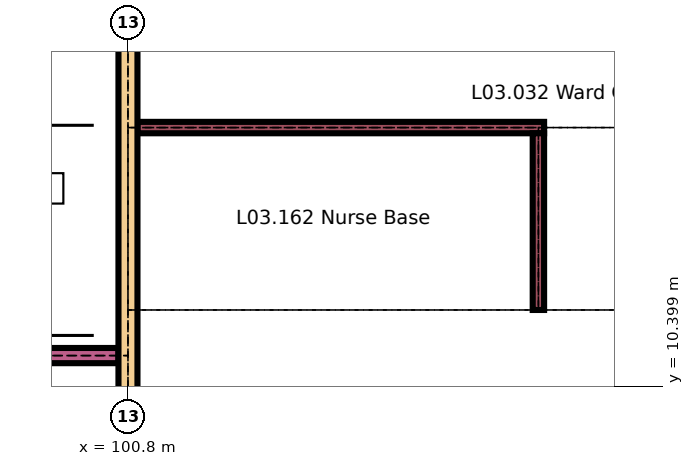
"""IFC4 building model, lengths in metres.
Left out: names, types, materials, properties, quantities, classifications, styles, units other than length and angle.
Written with IfcOpenShell. Run it as: python <this file> out.ifc"""

import sys

from ifc_helpers import new_model, si_unit, direction, frame, frame_2d, origin, place, context, subcontext, project, spatial, rectangle, extrude, element, fill, save


model = new_model("IFC4")
c1 = context("Model", 3, precision=1e-05, world=origin(), true_north=direction((0.0, 1.0)))
c2 = subcontext(c1, "Body", "Model", "MODEL_VIEW")
j1 = project(units=[si_unit("LENGTHUNIT", "METRE"), si_unit("PLANEANGLEUNIT", "RADIAN")], contexts=[c1])
p1 = place(None, origin())
s1 = spatial("IfcSite", under=j1, at=p1, CompositionType="ELEMENT")
p2 = place(p1, origin())
s2 = spatial("IfcBuilding", under=s1, at=p2, CompositionType="ELEMENT")
p3 = place(p2, frame((0.0, 0.0, 15.3)))
s3 = spatial("IfcBuildingStorey", under=s2, at=p3, CompositionType="ELEMENT", Elevation=15.3)
p4 = place(p3, frame((42.21, 12.6, 4.904), z_axis=(0.0, 0.0, 1.0), x_axis=(1.0, 0.0, 0.0)))
e1 = element("IfcWall", 1, at=p4, inside=s3, PredefinedType="SOLIDWALL", context=c2, shape_type="SweptSolid", body=[
    extrude(rectangle(XDim=58.38, YDim=0.2, at=frame_2d((29.19, 0.0))), origin(), (0.0, 0.0, 1.0), 2.539),
])
p5 = place(p4, frame((1.05, 0.0, 0.3)))
e2 = element("IfcOpeningElement", 2, at=p5, cuts=e1, PredefinedType="OPENING", context=c2, shape_type="SweptSolid", body=[
    extrude(rectangle(XDim=2.1, YDim=1.8, at=frame_2d((1.05, 0.9))), frame((0.0, 0.11, 0.0), z_axis=(0.0, -1.0, 0.0), x_axis=(1.0, 0.0, 0.0)), (0.0, 0.0, 1.0), 0.22),
])
p6 = place(p4, frame((5.25, 0.0, 0.3)))
e3 = element("IfcOpeningElement", 3, at=p6, cuts=e1, PredefinedType="OPENING", context=c2, shape_type="SweptSolid", body=[
    extrude(rectangle(XDim=2.1, YDim=1.8, at=frame_2d((1.05, 0.9))), frame((0.0, 0.11, 0.0), z_axis=(0.0, -1.0, 0.0), x_axis=(1.0, 0.0, 0.0)), (0.0, 0.0, 1.0), 0.22),
])
p7 = place(p4, frame((9.45, 0.0, 0.3)))
e4 = element("IfcOpeningElement", 4, at=p7, cuts=e1, PredefinedType="OPENING", context=c2, shape_type="SweptSolid", body=[
    extrude(rectangle(XDim=2.1, YDim=1.8, at=frame_2d((1.05, 0.9))), frame((0.0, 0.11, 0.0), z_axis=(0.0, -1.0, 0.0), x_axis=(1.0, 0.0, 0.0)), (0.0, 0.0, 1.0), 0.22),
])
p8 = place(p4, frame((13.65, 0.0, 0.3)))
e5 = element("IfcOpeningElement", 5, at=p8, cuts=e1, PredefinedType="OPENING", context=c2, shape_type="SweptSolid", body=[
    extrude(rectangle(XDim=2.1, YDim=1.8, at=frame_2d((1.05, 0.9))), frame((0.0, 0.11, 0.0), z_axis=(0.0, -1.0, 0.0), x_axis=(1.0, 0.0, 0.0)), (0.0, 0.0, 1.0), 0.22),
])
p9 = place(p4, frame((17.85, 0.0, 0.3)))
e6 = element("IfcOpeningElement", 6, at=p9, cuts=e1, PredefinedType="OPENING", context=c2, shape_type="SweptSolid", body=[
    extrude(rectangle(XDim=2.1, YDim=1.8, at=frame_2d((1.05, 0.9))), frame((0.0, 0.11, 0.0), z_axis=(0.0, -1.0, 0.0), x_axis=(1.0, 0.0, 0.0)), (0.0, 0.0, 1.0), 0.22),
])
p10 = place(p4, frame((22.05, 0.0, 0.3)))
e7 = element("IfcOpeningElement", 7, at=p10, cuts=e1, PredefinedType="OPENING", context=c2, shape_type="SweptSolid", body=[
    extrude(rectangle(XDim=2.1, YDim=1.8, at=frame_2d((1.05, 0.9))), frame((0.0, 0.11, 0.0), z_axis=(0.0, -1.0, 0.0), x_axis=(1.0, 0.0, 0.0)), (0.0, 0.0, 1.0), 0.22),
])
p11 = place(p4, frame((26.25, 0.0, 0.3)))
e8 = element("IfcOpeningElement", 8, at=p11, cuts=e1, PredefinedType="OPENING", context=c2, shape_type="SweptSolid", body=[
    extrude(rectangle(XDim=2.1, YDim=1.8, at=frame_2d((1.05, 0.9))), frame((0.0, 0.11, 0.0), z_axis=(0.0, -1.0, 0.0), x_axis=(1.0, 0.0, 0.0)), (0.0, 0.0, 1.0), 0.22),
])
p12 = place(p4, frame((30.45, 0.0, 0.3)))
e9 = element("IfcOpeningElement", 9, at=p12, cuts=e1, PredefinedType="OPENING", context=c2, shape_type="SweptSolid", body=[
    extrude(rectangle(XDim=2.1, YDim=1.8, at=frame_2d((1.05, 0.9))), frame((0.0, 0.11, 0.0), z_axis=(0.0, -1.0, 0.0), x_axis=(1.0, 0.0, 0.0)), (0.0, 0.0, 1.0), 0.22),
])
p13 = place(p4, frame((34.65, 0.0, 0.3)))
e10 = element("IfcOpeningElement", 10, at=p13, cuts=e1, PredefinedType="OPENING", context=c2, shape_type="SweptSolid", body=[
    extrude(rectangle(XDim=2.1, YDim=1.8, at=frame_2d((1.05, 0.9))), frame((0.0, 0.11, 0.0), z_axis=(0.0, -1.0, 0.0), x_axis=(1.0, 0.0, 0.0)), (0.0, 0.0, 1.0), 0.22),
])
p14 = place(p4, frame((38.85, 0.0, 0.3)))
e11 = element("IfcOpeningElement", 11, at=p14, cuts=e1, PredefinedType="OPENING", context=c2, shape_type="SweptSolid", body=[
    extrude(rectangle(XDim=2.1, YDim=1.8, at=frame_2d((1.05, 0.9))), frame((0.0, 0.11, 0.0), z_axis=(0.0, -1.0, 0.0), x_axis=(1.0, 0.0, 0.0)), (0.0, 0.0, 1.0), 0.22),
])
p15 = place(p4, frame((43.05, 0.0, 0.3)))
e12 = element("IfcOpeningElement", 12, at=p15, cuts=e1, PredefinedType="OPENING", context=c2, shape_type="SweptSolid", body=[
    extrude(rectangle(XDim=2.1, YDim=1.8, at=frame_2d((1.05, 0.9))), frame((0.0, 0.11, 0.0), z_axis=(0.0, -1.0, 0.0), x_axis=(1.0, 0.0, 0.0)), (0.0, 0.0, 1.0), 0.22),
])
p16 = place(p4, frame((47.25, 0.0, 0.3)))
e13 = element("IfcOpeningElement", 13, at=p16, cuts=e1, PredefinedType="OPENING", context=c2, shape_type="SweptSolid", body=[
    extrude(rectangle(XDim=2.1, YDim=1.8, at=frame_2d((1.05, 0.9))), frame((0.0, 0.11, 0.0), z_axis=(0.0, -1.0, 0.0), x_axis=(1.0, 0.0, 0.0)), (0.0, 0.0, 1.0), 0.22),
])
p17 = place(p4, frame((51.45, 0.0, 0.3)))
e14 = element("IfcOpeningElement", 14, at=p17, cuts=e1, PredefinedType="OPENING", context=c2, shape_type="SweptSolid", body=[
    extrude(rectangle(XDim=2.1, YDim=1.8, at=frame_2d((1.05, 0.9))), frame((0.0, 0.11, 0.0), z_axis=(0.0, -1.0, 0.0), x_axis=(1.0, 0.0, 0.0)), (0.0, 0.0, 1.0), 0.22),
])
p18 = place(p4, frame((55.65, 0.0, 0.3)))
e15 = element("IfcOpeningElement", 15, at=p18, cuts=e1, PredefinedType="OPENING", context=c2, shape_type="SweptSolid", body=[
    extrude(rectangle(XDim=2.1, YDim=1.8, at=frame_2d((1.05, 0.9))), frame((0.0, 0.11, 0.0), z_axis=(0.0, -1.0, 0.0), x_axis=(1.0, 0.0, 0.0)), (0.0, 0.0, 1.0), 0.22),
])
p19 = place(p3, frame((42.1, 10.8, 0.0), z_axis=(0.0, 0.0, 1.0), x_axis=(1.0, 0.0, 0.0)))
e16 = element("IfcWall", 16, at=p19, inside=s3, PredefinedType="PARTITIONING", context=c2, shape_type="SweptSolid", body=[
    extrude(rectangle(XDim=58.575, YDim=0.2, at=frame_2d((29.288, 0.0))), origin(), (0.0, 0.0, 1.0), 4.0),
])
p20 = place(p19, frame((4.15, 0.0, 0.0)))
e17 = element("IfcOpeningElement", 17, at=p20, cuts=e16, PredefinedType="OPENING", context=c2, shape_type="SweptSolid", body=[
    extrude(rectangle(XDim=1.4, YDim=2.1, at=frame_2d((0.7, 1.05))), frame((0.0, 0.11, 0.0), z_axis=(0.0, -1.0, 0.0), x_axis=(1.0, 0.0, 0.0)), (0.0, 0.0, 1.0), 0.22),
])
p21 = place(p19, frame((13.9, 0.0, 0.0)))
e18 = element("IfcOpeningElement", 18, at=p21, cuts=e16, PredefinedType="OPENING", context=c2, shape_type="SweptSolid", body=[
    extrude(rectangle(XDim=1.4, YDim=2.1, at=frame_2d((0.7, 1.05))), frame((0.0, 0.11, 0.0), z_axis=(0.0, -1.0, 0.0), x_axis=(1.0, 0.0, 0.0)), (0.0, 0.0, 1.0), 0.22),
])
p22 = place(p19, frame((23.3, 0.0, 0.0)))
e19 = element("IfcOpeningElement", 19, at=p22, cuts=e16, PredefinedType="OPENING", context=c2, shape_type="SweptSolid", body=[
    extrude(rectangle(XDim=1.4, YDim=2.1, at=frame_2d((0.7, 1.05))), frame((0.0, 0.11, 0.0), z_axis=(0.0, -1.0, 0.0), x_axis=(1.0, 0.0, 0.0)), (0.0, 0.0, 1.0), 0.22),
])
p23 = place(p19, frame((32.0, 0.0, 0.0)))
e20 = element("IfcOpeningElement", 20, at=p23, cuts=e16, PredefinedType="OPENING", context=c2, shape_type="SweptSolid", body=[
    extrude(rectangle(XDim=1.4, YDim=2.1, at=frame_2d((0.7, 1.05))), frame((0.0, 0.11, 0.0), z_axis=(0.0, -1.0, 0.0), x_axis=(1.0, 0.0, 0.0)), (0.0, 0.0, 1.0), 0.22),
])
p24 = place(p19, frame((40.4, 0.0, 0.0)))
e21 = element("IfcOpeningElement", 21, at=p24, cuts=e16, PredefinedType="OPENING", context=c2, shape_type="SweptSolid", body=[
    extrude(rectangle(XDim=1.4, YDim=2.1, at=frame_2d((0.7, 1.05))), frame((0.0, 0.11, 0.0), z_axis=(0.0, -1.0, 0.0), x_axis=(1.0, 0.0, 0.0)), (0.0, 0.0, 1.0), 0.22),
])
p25 = place(p19, frame((48.1, 0.0, 0.0)))
e22 = element("IfcOpeningElement", 22, at=p25, cuts=e16, PredefinedType="OPENING", context=c2, shape_type="SweptSolid", body=[
    extrude(rectangle(XDim=1.4, YDim=2.1, at=frame_2d((0.7, 1.05))), frame((0.0, 0.11, 0.0), z_axis=(0.0, -1.0, 0.0), x_axis=(1.0, 0.0, 0.0)), (0.0, 0.0, 1.0), 0.22),
])
p26 = place(p19, frame((54.738, 0.0, 0.0)))
e23 = element("IfcOpeningElement", 23, at=p26, cuts=e16, PredefinedType="OPENING", context=c2, shape_type="SweptSolid", body=[
    extrude(rectangle(XDim=1.4, YDim=2.1, at=frame_2d((0.7, 1.05))), frame((0.0, 0.11, 0.0), z_axis=(0.0, -1.0, 0.0), x_axis=(1.0, 0.0, 0.0)), (0.0, 0.0, 1.0), 0.22),
])
p27 = place(p3, frame((100.925, 13.8, 0.0), z_axis=(0.0, 0.0, 1.0), x_axis=(1.0, 0.0, 0.0)))
e24 = element("IfcWall", 24, at=p27, inside=s3, PredefinedType="PARTITIONING", context=c2, shape_type="SweptSolid", body=[
    extrude(rectangle(XDim=5.35, YDim=0.15, at=frame_2d((2.675, 0.0))), origin(), (0.0, 0.0, 1.0), 3.26),
])
p28 = place(p3, frame((100.8, 3.6, 0.0), z_axis=(0.0, 0.0, 1.0), x_axis=(0.0, 1.0, 0.0)))
e25 = element("IfcWall", 25, at=p28, inside=s3, PredefinedType="SOLIDWALL", context=c2, shape_type="SweptSolid", body=[
    extrude(rectangle(XDim=12.825, YDim=0.25, at=frame_2d((6.413, 0.0))), origin(), (0.0, 0.0, 1.0), 3.26),
])
p29 = place(p28, frame((1.5, 0.0, 0.0)))
e26 = element("IfcOpeningElement", 26, at=p29, cuts=e25, PredefinedType="OPENING", context=c2, shape_type="SweptSolid", body=[
    extrude(rectangle(XDim=1.8, YDim=2.4, at=frame_2d((0.9, 1.2))), frame((0.0, 0.135, 0.0), z_axis=(0.0, -1.0, 0.0), x_axis=(1.0, 0.0, 0.0)), (0.0, 0.0, 1.0), 0.27),
])
p30 = place(p3, frame((106.2, 11.4, 0.0), z_axis=(0.0, 0.0, 1.0), x_axis=(0.0, 1.0, 0.0)))
e27 = element("IfcWall", 27, at=p30, inside=s3, PredefinedType="PARTITIONING", context=c2, shape_type="SweptSolid", body=[
    extrude(rectangle(XDim=2.325, YDim=0.15, at=frame_2d((1.163, 0.0))), origin(), (0.0, 0.0, 1.0), 3.26),
])
p31 = place(p18, origin())
e28 = element("IfcWindow", 28, at=p31, inside=s3, PartitioningType="SINGLE_PANEL", PredefinedType="WINDOW", context=c2, shape_type="SweptSolid", body=[
    extrude(rectangle(XDim=2.1, YDim=1.8, at=frame_2d((1.05, 0.9))), frame((0.0, 0.075, 0.0), z_axis=(0.0, -1.0, 0.0), x_axis=(1.0, 0.0, 0.0)), (0.0, 0.0, 1.0), 0.15),
])
fill(e15, e28)
save(model, sys.argv[1])
